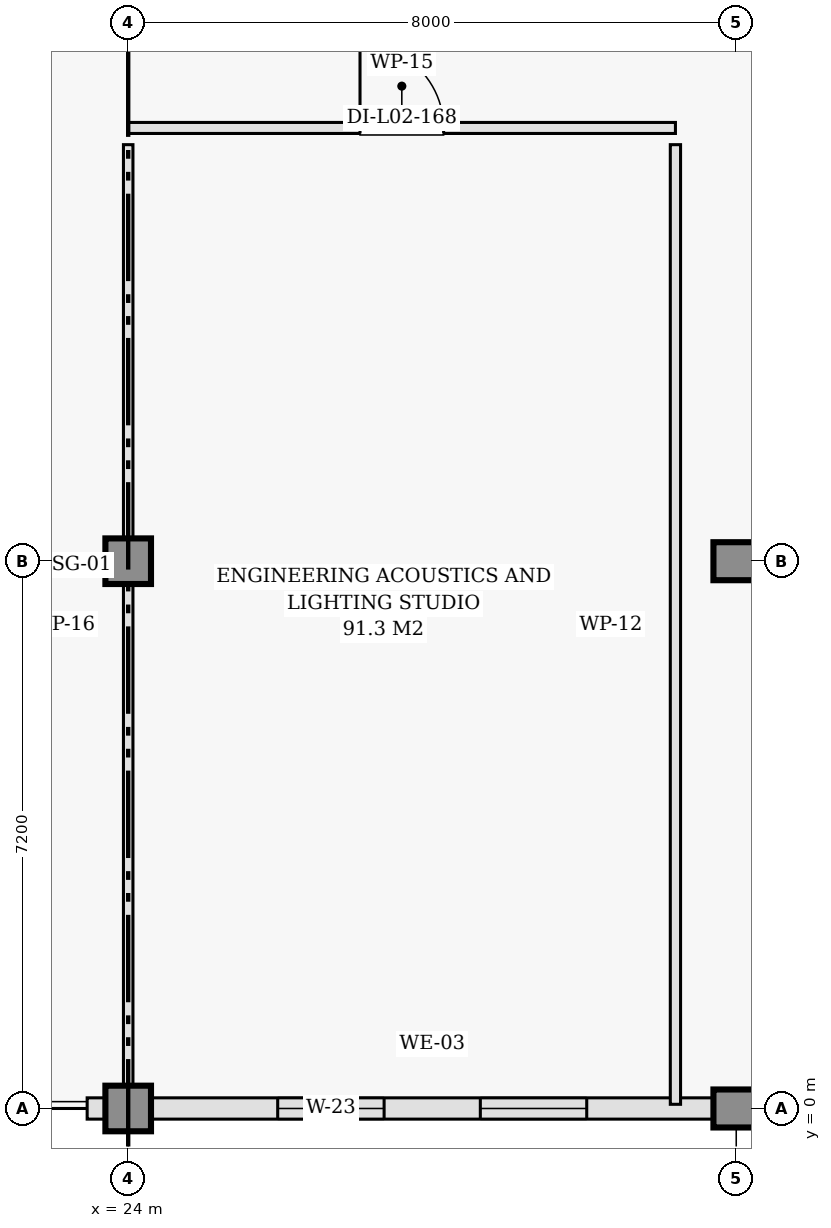
"""IFC4 building model, lengths in metres.
Left out: names, types, materials, properties, quantities, classifications, styles, units other than length and angle.
Written with IfcOpenShell. Run it as: python <this file> out.ifc"""

import sys

from ifc_helpers import new_model, si_unit, direction, frame, frame_2d, origin, origin_2d, place, context, subcontext, project, spatial, rectangle, extrude, element, fill, save


model = new_model("IFC4")
c1 = context("Model", 3, precision=1e-05, world=origin(), true_north=direction((0.0, 1.0)))
c2 = subcontext(c1, "Body", "Model", "MODEL_VIEW")
j1 = project(units=[si_unit("LENGTHUNIT", "METRE"), si_unit("PLANEANGLEUNIT", "RADIAN")], contexts=[c1])
p1 = place(None, origin())
s1 = spatial("IfcSite", under=j1, at=p1, CompositionType="ELEMENT")
p2 = place(p1, origin())
s2 = spatial("IfcBuilding", under=s1, at=p2, CompositionType="ELEMENT")
p3 = place(p2, frame((0.0, 0.0, 9.6)))
s3 = spatial("IfcBuildingStorey", under=s2, at=p3, CompositionType="ELEMENT", Elevation=9.6)
for number, where, z_axis, x_axis in (
    (1, (24.0, 0.0, 0.0), (0.0, 0.0, 1.0), (1.0, 0.0, 0.0)),
    (2, (24.0, 7.2, 0.0), (0.0, 0.0, 1.0), (1.0, 0.0, 0.0)),
):
    element("IfcColumn", number, at=place(p3, frame(where, z_axis=z_axis, x_axis=x_axis)), inside=s3, PredefinedType="COLUMN", context=c2, shape_type="SweptSolid", body=[
        extrude(rectangle(XDim=0.6, YDim=0.6, at=origin_2d()), origin(), (0.0, 0.0, 1.0), 4.2),
    ])
for number, where, z_axis, x_axis in (
    (3, (32.0, 0.0, 0.0), (0.0, 0.0, 1.0), (1.0, 0.0, 0.0)),
    (4, (32.0, 7.2, 0.0), (0.0, 0.0, 1.0), (1.0, 0.0, 0.0)),
):
    element("IfcColumn", number, at=place(p3, frame(where, z_axis=z_axis, x_axis=x_axis)), inside=s3, PredefinedType="COLUMN", context=c2, shape_type="SweptSolid", body=[
        extrude(rectangle(XDim=0.5, YDim=0.5, at=origin_2d()), origin(), (0.0, 0.0, 1.0), 4.2),
    ])
p4 = place(p3, frame((23.46, 0.0, 0.0), z_axis=(0.0, 0.0, 1.0), x_axis=(1.0, 0.0, 0.0)))
e5 = element("IfcWall", 5, at=p4, inside=s3, PredefinedType="SOLIDWALL", context=c2, shape_type="SweptSolid", body=[
    extrude(rectangle(XDim=0.54, YDim=0.28, at=frame_2d((0.27, 0.0))), origin(), (0.0, 0.0, 1.0), 4.2),
])
p5 = place(p3, frame((24.0, 0.0, 0.0), z_axis=(0.0, 0.0, 1.0), x_axis=(1.0, 0.0, 0.0)))
e6 = element("IfcWall", 6, at=p5, inside=s3, PredefinedType="SOLIDWALL", context=c2, shape_type="SweptSolid", body=[
    extrude(rectangle(XDim=8.0, YDim=0.28, at=frame_2d((4.0, 0.0))), origin(), (0.0, 0.0, 1.0), 4.2),
])
p6 = place(p5, frame((1.967, 0.0, 0.9)))
e7 = element("IfcOpeningElement", 7, at=p6, cuts=e6, PredefinedType="OPENING", context=c2, shape_type="SweptSolid", body=[
    extrude(rectangle(XDim=1.4, YDim=2.2, at=frame_2d((0.7, 1.1))), frame((0.0, 0.15, 0.0), z_axis=(0.0, -1.0, 0.0), x_axis=(1.0, 0.0, 0.0)), (0.0, 0.0, 1.0), 0.3),
])
p7 = place(p5, frame((4.633, 0.0, 0.9)))
e8 = element("IfcOpeningElement", 8, at=p7, cuts=e6, PredefinedType="OPENING", context=c2, shape_type="SweptSolid", body=[
    extrude(rectangle(XDim=1.4, YDim=2.2, at=frame_2d((0.7, 1.1))), frame((0.0, 0.15, 0.0), z_axis=(0.0, -1.0, 0.0), x_axis=(1.0, 0.0, 0.0)), (0.0, 0.0, 1.0), 0.3),
])
p8 = place(p3, frame((32.0, 0.0, 0.0), z_axis=(0.0, 0.0, 1.0), x_axis=(1.0, 0.0, 0.0)))
e9 = element("IfcWall", 9, at=p8, inside=s3, PredefinedType="SOLIDWALL", context=c2, shape_type="SweptSolid", body=[
    extrude(rectangle(XDim=8.0, YDim=0.28, at=frame_2d((4.0, 0.0))), origin(), (0.0, 0.0, 1.0), 4.2),
])
p9 = place(p8, frame((4.833, 0.0, 0.9)))
e10 = element("IfcOpeningElement", 10, at=p9, cuts=e9, PredefinedType="OPENING", context=c2, shape_type="SweptSolid", body=[
    extrude(rectangle(XDim=1.0, YDim=2.15, at=frame_2d((0.5, 1.075))), frame((0.0, 0.15, 0.0), z_axis=(0.0, -1.0, 0.0), x_axis=(1.0, 0.0, 0.0)), (0.0, 0.0, 1.0), 0.3),
])
p10 = place(p3, frame((24.0, 12.9, 0.0), z_axis=(0.0, 0.0, 1.0), x_axis=(1.0, 0.0, 0.0)))
e11 = element("IfcWall", 11, at=p10, inside=s3, PredefinedType="PARTITIONING", context=c2, shape_type="SweptSolid", body=[
    extrude(rectangle(XDim=7.2, YDim=0.145, at=frame_2d((3.6, 0.0))), origin(), (0.0, 0.0, 1.0), 3.94),
])
p11 = place(p10, frame((3.05, 0.0, 0.0)))
e12 = element("IfcOpeningElement", 12, at=p11, cuts=e11, PredefinedType="OPENING", context=c2, shape_type="SweptSolid", body=[
    extrude(rectangle(XDim=1.1, YDim=2.15, at=frame_2d((0.55, 1.075))), frame((0.0, 0.083, 0.0), z_axis=(0.0, -1.0, 0.0), x_axis=(1.0, 0.0, 0.0)), (0.0, 0.0, 1.0), 0.165),
])
p12 = place(p3, frame((31.2, 0.055, 0.0), z_axis=(0.0, 0.0, 1.0), x_axis=(0.0, 1.0, 0.0)))
e13 = element("IfcWall", 13, at=p12, inside=s3, PredefinedType="PARTITIONING", context=c2, shape_type="SweptSolid", body=[
    extrude(rectangle(XDim=12.625, YDim=0.135, at=frame_2d((6.312, 0.0))), origin(), (0.0, 0.0, 1.0), 3.94),
])
p13 = place(p3, frame((24.0, 0.055, 0.0), z_axis=(0.0, 0.0, 1.0), x_axis=(0.0, 1.0, 0.0)))
e14 = element("IfcWall", 14, at=p13, inside=s3, PredefinedType="PARTITIONING", context=c2, shape_type="SweptSolid", body=[
    extrude(rectangle(XDim=12.625, YDim=0.125, at=frame_2d((6.312, 0.0))), origin(), (0.0, 0.0, 1.0), 3.94),
])
p14 = place(p6, origin())
e15 = element("IfcWindow", 15, at=p14, inside=s3, PartitioningType="DOUBLE_PANEL_VERTICAL", PredefinedType="WINDOW", context=c2, shape_type="SweptSolid", body=[
    extrude(rectangle(XDim=1.4, YDim=2.2, at=frame_2d((0.7, 1.1))), frame((0.0, 0.03, 0.0), z_axis=(0.0, -1.0, 0.0), x_axis=(1.0, 0.0, 0.0)), (0.0, 0.0, 1.0), 0.06),
])
fill(e7, e15)
p15 = place(p7, origin())
e16 = element("IfcWindow", 16, at=p15, inside=s3, PartitioningType="DOUBLE_PANEL_VERTICAL", PredefinedType="WINDOW", context=c2, shape_type="SweptSolid", body=[
    extrude(rectangle(XDim=1.4, YDim=2.2, at=frame_2d((0.7, 1.1))), frame((0.0, 0.03, 0.0), z_axis=(0.0, -1.0, 0.0), x_axis=(1.0, 0.0, 0.0)), (0.0, 0.0, 1.0), 0.06),
])
fill(e8, e16)
p16 = place(p11, origin())
e17 = element("IfcDoor", 17, at=p16, inside=s3, OperationType="SINGLE_SWING_LEFT", PredefinedType="DOOR", context=c2, shape_type="SweptSolid", body=[
    extrude(rectangle(XDim=1.1, YDim=2.15, at=frame_2d((0.55, 1.075))), frame((0.0, 0.025, 0.0), z_axis=(0.0, -1.0, 0.0), x_axis=(1.0, 0.0, 0.0)), (0.0, 0.0, 1.0), 0.05),
])
fill(e12, e17)
save(model, sys.argv[1])
